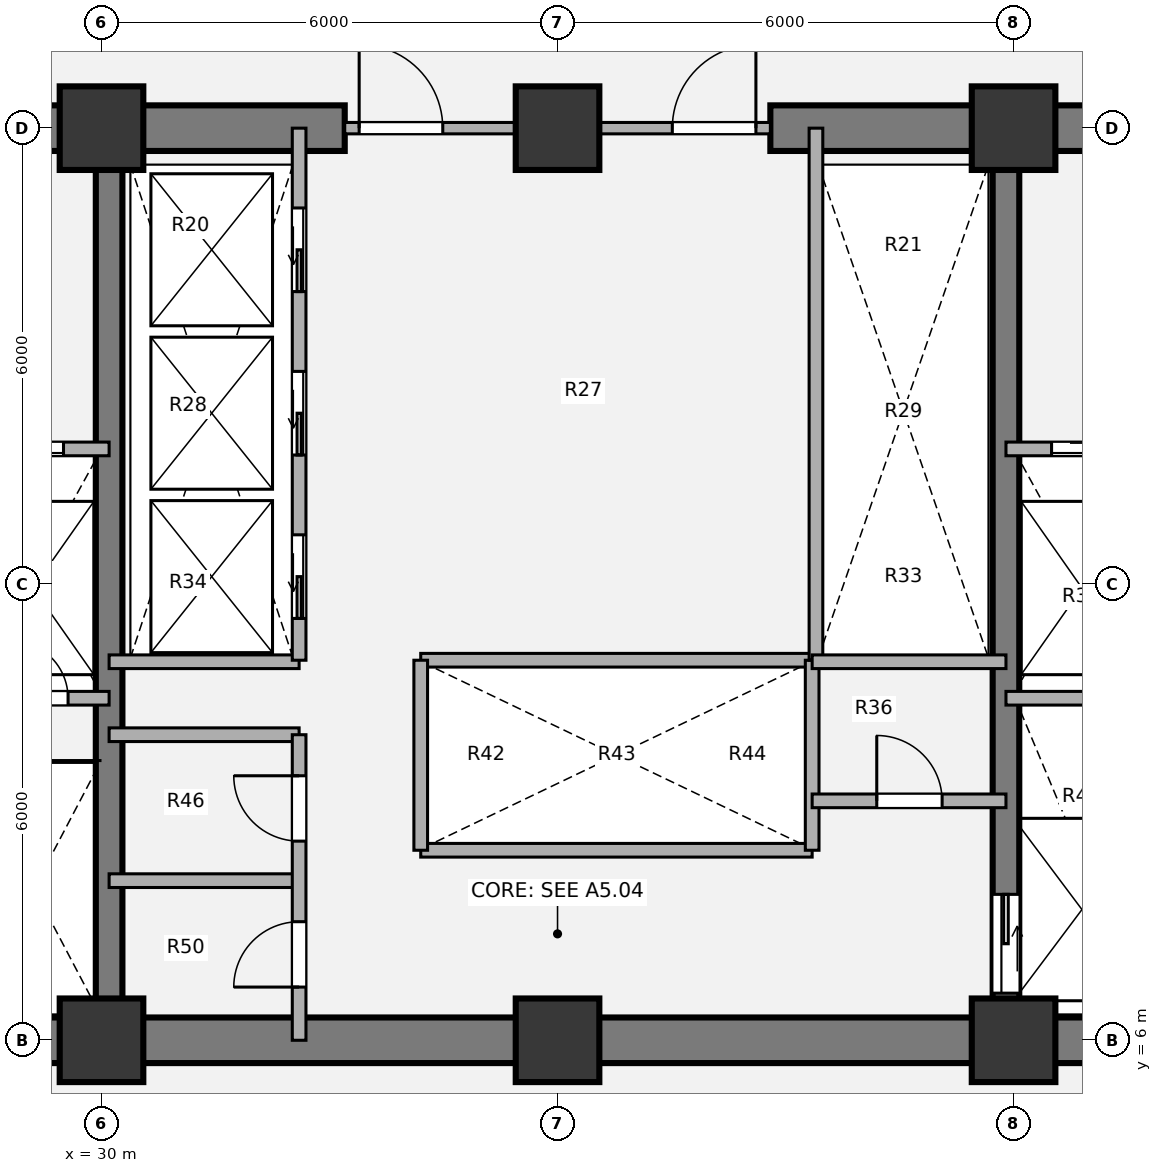
"""IFC4 building model, lengths in metres.
Left out: names, types, materials, properties, quantities, classifications, styles, units other than length and angle.
Written with IfcOpenShell. Run it as: python <this file> out.ifc"""

import sys

from ifc_helpers import new_model, si_unit, direction, frame, frame_2d, origin, origin_2d, place, context, subcontext, project, spatial, rectangle, extrude, source, transform, mapped, element, fill, save


model = new_model("IFC4")
c1 = context("Model", 3, precision=1e-05, world=origin(), true_north=direction((0.0, 1.0)))
c2 = subcontext(c1, "Body", "Model", "MODEL_VIEW")
j1 = project(units=[si_unit("LENGTHUNIT", "METRE"), si_unit("PLANEANGLEUNIT", "RADIAN")], contexts=[c1])
p1 = place(None, origin())
s1 = spatial("IfcSite", under=j1, at=p1, CompositionType="ELEMENT")
p2 = place(p1, origin())
s2 = spatial("IfcBuilding", under=s1, at=p2, CompositionType="ELEMENT")
p3 = place(p2, frame((0.0, 0.0, 42.12)))
s3 = spatial("IfcBuildingStorey", under=s2, at=p3, CompositionType="ELEMENT", Elevation=42.12)
m1 = source(origin(), c2, "Body", "SweptSolid", [
    extrude(rectangle(XDim=1.1, YDim=1.1, at=origin_2d()), origin(), (0.0, 0.0, 1.0), 3.78),
])
for number, where, z_axis, x_axis in (
    (1, (30.0, 6.0, 0.0), (0.0, 0.0, 1.0), (1.0, 0.0, 0.0)),
    (2, (36.0, 6.0, 0.0), (0.0, 0.0, 1.0), (1.0, 0.0, 0.0)),
    (3, (42.0, 6.0, 0.0), (0.0, 0.0, 1.0), (1.0, 0.0, 0.0)),
    (4, (30.0, 18.0, 0.0), (0.0, 0.0, 1.0), (1.0, 0.0, 0.0)),
    (5, (36.0, 18.0, 0.0), (0.0, 0.0, 1.0), (1.0, 0.0, 0.0)),
    (6, (42.0, 18.0, 0.0), (0.0, 0.0, 1.0), (1.0, 0.0, 0.0)),
):
    element("IfcColumn", number, at=place(p3, frame(where, z_axis=z_axis, x_axis=x_axis)), inside=s3, PredefinedType="COLUMN", context=c2, shape_type="MappedRepresentation", body=[
        mapped(m1, transform((0.0, 0.0, 0.0), x_axis=(1.0, 0.0, 0.0), y_axis=(0.0, 1.0, 0.0), z_axis=(0.0, 0.0, 1.0), scale=1.0)),
    ])
p4 = place(p3, frame((48.3, 6.0, 0.0), z_axis=(0.0, 0.0, 1.0), x_axis=(-1.0, 0.0, 0.0)))
e7 = element("IfcWall", 7, at=p4, inside=s3, PredefinedType="SHEAR", context=c2, shape_type="SweptSolid", body=[
    extrude(rectangle(XDim=24.6, YDim=0.6, at=frame_2d((12.3, 0.0))), origin(), (0.0, 0.0, 1.0), 3.78),
])
p5 = place(p3, frame((23.7, 18.0, 0.0), z_axis=(0.0, 0.0, 1.0), x_axis=(1.0, 0.0, 0.0)))
e8 = element("IfcWall", 8, at=p5, inside=s3, PredefinedType="SHEAR", context=c2, shape_type="SweptSolid", body=[
    extrude(rectangle(XDim=9.5, YDim=0.6, at=frame_2d((4.75, 0.0))), origin(), (0.0, 0.0, 1.0), 3.78),
])
p6 = place(p5, frame((2.95, 0.0, 0.0)))
e9 = element("IfcOpeningElement", 9, at=p6, cuts=e8, PredefinedType="OPENING", context=c2, shape_type="SweptSolid", body=[
    extrude(rectangle(XDim=1.1, YDim=2.1, at=origin_2d()), frame((0.55, 0.31, 1.05), z_axis=(0.0, -1.0, 0.0), x_axis=(1.0, 0.0, 0.0)), (0.0, 0.0, 1.0), 0.62),
])
p7 = place(p3, frame((38.8, 18.0, 0.0), z_axis=(0.0, 0.0, 1.0), x_axis=(1.0, 0.0, 0.0)))
e10 = element("IfcWall", 10, at=p7, inside=s3, PredefinedType="SHEAR", context=c2, shape_type="SweptSolid", body=[
    extrude(rectangle(XDim=9.5, YDim=0.6, at=frame_2d((4.75, 0.0))), origin(), (0.0, 0.0, 1.0), 3.78),
])
p8 = place(p7, frame((5.45, 0.0, 0.0)))
e11 = element("IfcOpeningElement", 11, at=p8, cuts=e10, PredefinedType="OPENING", context=c2, shape_type="SweptSolid", body=[
    extrude(rectangle(XDim=1.1, YDim=2.1, at=origin_2d()), frame((0.55, 0.31, 1.05), z_axis=(0.0, -1.0, 0.0), x_axis=(1.0, 0.0, 0.0)), (0.0, 0.0, 1.0), 0.62),
])
p9 = place(p3, frame((30.1, 6.0, 0.0), z_axis=(0.0, 0.0, 1.0), x_axis=(0.0, 1.0, 0.0)))
e12 = element("IfcWall", 12, at=p9, inside=s3, PredefinedType="SHEAR", context=c2, shape_type="SweptSolid", body=[
    extrude(rectangle(XDim=12.0, YDim=0.35, at=frame_2d((6.0, 0.0))), origin(), (0.0, 0.0, 1.0), 3.78),
])
p10 = place(p3, frame((41.9, 18.0, 0.0), z_axis=(0.0, 0.0, 1.0), x_axis=(0.0, -1.0, 0.0)))
e13 = element("IfcWall", 13, at=p10, inside=s3, PredefinedType="SHEAR", context=c2, shape_type="SweptSolid", body=[
    extrude(rectangle(XDim=12.0, YDim=0.35, at=frame_2d((6.0, 0.0))), origin(), (0.0, 0.0, 1.0), 3.78),
])
p11 = place(p10, frame((10.08, 0.0, 0.0)))
e14 = element("IfcOpeningElement", 14, at=p11, cuts=e13, PredefinedType="OPENING", context=c2, shape_type="SweptSolid", body=[
    extrude(rectangle(XDim=1.3, YDim=2.1, at=origin_2d()), frame((0.65, 0.185, 1.05), z_axis=(0.0, -1.0, 0.0), x_axis=(1.0, 0.0, 0.0)), (0.0, 0.0, 1.0), 0.37),
])
for number, where, z_axis, x_axis in (
    (15, (34.2, 11.0, 0.0), (0.0, 0.0, 1.0), (1.0, 0.0, 0.0)),
    (16, (34.2, 8.5, 0.0), (0.0, 0.0, 1.0), (1.0, 0.0, 0.0)),
):
    element("IfcWall", number, at=place(p3, frame(where, z_axis=z_axis, x_axis=x_axis)), inside=s3, PredefinedType="PARTITIONING", context=c2, shape_type="SweptSolid", body=[
        extrude(rectangle(XDim=5.15, YDim=0.18, at=frame_2d((2.575, 0.0))), origin(), (0.0, 0.0, 1.0), 3.5),
    ])
for number, where, z_axis, x_axis in (
    (17, (34.2, 8.5, 0.0), (0.0, 0.0, 1.0), (0.0, 1.0, 0.0)),
    (18, (39.35, 8.5, 0.0), (0.0, 0.0, 1.0), (0.0, 1.0, 0.0)),
):
    element("IfcWall", number, at=place(p3, frame(where, z_axis=z_axis, x_axis=x_axis)), inside=s3, PredefinedType="PARTITIONING", context=c2, shape_type="SweptSolid", body=[
        extrude(rectangle(XDim=2.5, YDim=0.18, at=frame_2d((1.25, 0.0))), origin(), (0.0, 0.0, 1.0), 3.5),
    ])
p12 = place(p3, frame((39.4, 11.0, 0.0), z_axis=(0.0, 0.0, 1.0), x_axis=(0.0, 1.0, 0.0)))
e19 = element("IfcWall", 19, at=p12, inside=s3, PredefinedType="PARTITIONING", context=c2, shape_type="SweptSolid", body=[
    extrude(rectangle(XDim=7.0, YDim=0.18, at=frame_2d((3.5, 0.0))), origin(), (0.0, 0.0, 1.0), 3.5),
])
p13 = place(p3, frame((30.1, 10.98, 0.0), z_axis=(0.0, 0.0, 1.0), x_axis=(1.0, 0.0, 0.0)))
e20 = element("IfcWall", 20, at=p13, inside=s3, PredefinedType="PARTITIONING", context=c2, shape_type="SweptSolid", body=[
    extrude(rectangle(XDim=2.5, YDim=0.18, at=frame_2d((1.25, 0.0))), origin(), (0.0, 0.0, 1.0), 3.5),
])
p14 = place(p3, frame((39.35, 10.98, 0.0), z_axis=(0.0, 0.0, 1.0), x_axis=(1.0, 0.0, 0.0)))
e21 = element("IfcWall", 21, at=p14, inside=s3, PredefinedType="PARTITIONING", context=c2, shape_type="SweptSolid", body=[
    extrude(rectangle(XDim=2.55, YDim=0.18, at=frame_2d((1.275, 0.0))), origin(), (0.0, 0.0, 1.0), 3.5),
])
for number, where, z_axis, x_axis in (
    (22, (30.1, 8.1, 0.0), (0.0, 0.0, 1.0), (1.0, 0.0, 0.0)),
    (23, (30.1, 10.02, 0.0), (0.0, 0.0, 1.0), (1.0, 0.0, 0.0)),
):
    element("IfcWall", number, at=place(p3, frame(where, z_axis=z_axis, x_axis=x_axis)), inside=s3, PredefinedType="PARTITIONING", context=c2, shape_type="SweptSolid", body=[
        extrude(rectangle(XDim=2.5, YDim=0.18, at=frame_2d((1.25, 0.0))), origin(), (0.0, 0.0, 1.0), 3.5),
    ])
p15 = place(p3, frame((32.6, 6.0, 0.0), z_axis=(0.0, 0.0, 1.0), x_axis=(0.0, 1.0, 0.0)))
e24 = element("IfcWall", 24, at=p15, inside=s3, PredefinedType="PARTITIONING", context=c2, shape_type="SweptSolid", body=[
    extrude(rectangle(XDim=4.02, YDim=0.18, at=frame_2d((2.01, 0.0))), origin(), (0.0, 0.0, 1.0), 3.5),
])
p16 = place(p15, frame((0.7, 0.0, 0.0)))
e25 = element("IfcOpeningElement", 25, at=p16, cuts=e24, PredefinedType="OPENING", context=c2, shape_type="SweptSolid", body=[
    extrude(rectangle(XDim=0.86, YDim=2.1, at=origin_2d()), frame((0.43, 0.1, 1.05), z_axis=(0.0, -1.0, 0.0), x_axis=(1.0, 0.0, 0.0)), (0.0, 0.0, 1.0), 0.2),
])
p17 = place(p15, frame((2.62, 0.0, 0.0)))
e26 = element("IfcOpeningElement", 26, at=p17, cuts=e24, PredefinedType="OPENING", context=c2, shape_type="SweptSolid", body=[
    extrude(rectangle(XDim=0.86, YDim=2.1, at=origin_2d()), frame((0.43, 0.1, 1.05), z_axis=(0.0, -1.0, 0.0), x_axis=(1.0, 0.0, 0.0)), (0.0, 0.0, 1.0), 0.2),
])
p18 = place(p3, frame((39.35, 9.15, 0.0), z_axis=(0.0, 0.0, 1.0), x_axis=(1.0, 0.0, 0.0)))
e27 = element("IfcWall", 27, at=p18, inside=s3, PredefinedType="PARTITIONING", context=c2, shape_type="SweptSolid", body=[
    extrude(rectangle(XDim=2.55, YDim=0.18, at=frame_2d((1.275, 0.0))), origin(), (0.0, 0.0, 1.0), 3.5),
])
p19 = place(p18, frame((0.85, 0.0, 0.0)))
e28 = element("IfcOpeningElement", 28, at=p19, cuts=e27, PredefinedType="OPENING", context=c2, shape_type="SweptSolid", body=[
    extrude(rectangle(XDim=0.86, YDim=2.1, at=origin_2d()), frame((0.43, 0.1, 1.05), z_axis=(0.0, -1.0, 0.0), x_axis=(1.0, 0.0, 0.0)), (0.0, 0.0, 1.0), 0.2),
])
p20 = place(p3, frame((33.2, 18.0, 0.0), z_axis=(0.0, 0.0, 1.0), x_axis=(1.0, 0.0, 0.0)))
e29 = element("IfcWall", 29, at=p20, inside=s3, PredefinedType="PARTITIONING", context=c2, shape_type="SweptSolid", body=[
    extrude(rectangle(XDim=5.6, YDim=0.15, at=frame_2d((2.8, 0.0))), origin(), (0.0, 0.0, 1.0), 2.315),
])
p21 = place(p20, frame((0.19, 0.0, 0.0)))
e30 = element("IfcOpeningElement", 30, at=p21, cuts=e29, PredefinedType="OPENING", context=c2, shape_type="SweptSolid", body=[
    extrude(rectangle(XDim=1.1, YDim=2.1, at=origin_2d()), frame((0.55, 0.085, 1.05), z_axis=(0.0, -1.0, 0.0), x_axis=(1.0, 0.0, 0.0)), (0.0, 0.0, 1.0), 0.17),
])
p22 = place(p20, frame((4.31, 0.0, 0.0)))
e31 = element("IfcOpeningElement", 31, at=p22, cuts=e29, PredefinedType="OPENING", context=c2, shape_type="SweptSolid", body=[
    extrude(rectangle(XDim=1.1, YDim=2.1, at=origin_2d()), frame((0.55, 0.085, 1.05), z_axis=(0.0, -1.0, 0.0), x_axis=(1.0, 0.0, 0.0)), (0.0, 0.0, 1.0), 0.17),
])
p23 = place(p3, frame((24.0, 13.78, 0.0), z_axis=(0.0, 0.0, 1.0), x_axis=(1.0, 0.0, 0.0)))
e32 = element("IfcWall", 32, at=p23, inside=s3, PredefinedType="PARTITIONING", context=c2, shape_type="SweptSolid", body=[
    extrude(rectangle(XDim=6.1, YDim=0.18, at=frame_2d((3.05, 0.0))), origin(), (0.0, 0.0, 1.0), 3.5),
])
p24 = place(p23, frame((1.15, 0.0, 0.0)))
e33 = element("IfcOpeningElement", 33, at=p24, cuts=e32, PredefinedType="OPENING", context=c2, shape_type="SweptSolid", body=[
    extrude(rectangle(XDim=1.1, YDim=2.1, at=origin_2d()), frame((0.55, 0.1, 1.05), z_axis=(0.0, -1.0, 0.0), x_axis=(1.0, 0.0, 0.0)), (0.0, 0.0, 1.0), 0.2),
])
p25 = place(p23, frame((4.4, 0.0, 0.0)))
e34 = element("IfcOpeningElement", 34, at=p25, cuts=e32, PredefinedType="OPENING", context=c2, shape_type="SweptSolid", body=[
    extrude(rectangle(XDim=1.1, YDim=2.1, at=origin_2d()), frame((0.55, 0.1, 1.05), z_axis=(0.0, -1.0, 0.0), x_axis=(1.0, 0.0, 0.0)), (0.0, 0.0, 1.0), 0.2),
])
p26 = place(p3, frame((28.15, 10.5, 0.0), z_axis=(0.0, 0.0, 1.0), x_axis=(1.0, 0.0, 0.0)))
e35 = element("IfcWall", 35, at=p26, inside=s3, PredefinedType="PARTITIONING", context=c2, shape_type="SweptSolid", body=[
    extrude(rectangle(XDim=1.95, YDim=0.18, at=frame_2d((0.975, 0.0))), origin(), (0.0, 0.0, 1.0), 3.5),
])
p27 = place(p26, frame((0.65, 0.0, 0.0)))
e36 = element("IfcOpeningElement", 36, at=p27, cuts=e35, PredefinedType="OPENING", context=c2, shape_type="SweptSolid", body=[
    extrude(rectangle(XDim=0.76, YDim=2.05, at=origin_2d()), frame((0.38, 0.1, 1.025), z_axis=(0.0, -1.0, 0.0), x_axis=(1.0, 0.0, 0.0)), (0.0, 0.0, 1.0), 0.2),
])
p28 = place(p3, frame((41.9, 13.78, 0.0), z_axis=(0.0, 0.0, 1.0), x_axis=(1.0, 0.0, 0.0)))
e37 = element("IfcWall", 37, at=p28, inside=s3, PredefinedType="PARTITIONING", context=c2, shape_type="SweptSolid", body=[
    extrude(rectangle(XDim=6.1, YDim=0.18, at=frame_2d((3.05, 0.0))), origin(), (0.0, 0.0, 1.0), 3.5),
])
p29 = place(p28, frame((0.6, 0.0, 0.0)))
e38 = element("IfcOpeningElement", 38, at=p29, cuts=e37, PredefinedType="OPENING", context=c2, shape_type="SweptSolid", body=[
    extrude(rectangle(XDim=1.1, YDim=2.1, at=origin_2d()), frame((0.55, 0.1, 1.05), z_axis=(0.0, -1.0, 0.0), x_axis=(1.0, 0.0, 0.0)), (0.0, 0.0, 1.0), 0.2),
])
p30 = place(p28, frame((3.8, 0.0, 0.0)))
e39 = element("IfcOpeningElement", 39, at=p30, cuts=e37, PredefinedType="OPENING", context=c2, shape_type="SweptSolid", body=[
    extrude(rectangle(XDim=1.1, YDim=2.1, at=origin_2d()), frame((0.55, 0.1, 1.05), z_axis=(0.0, -1.0, 0.0), x_axis=(1.0, 0.0, 0.0)), (0.0, 0.0, 1.0), 0.2),
])
p31 = place(p3, frame((41.9, 10.5, 0.0), z_axis=(0.0, 0.0, 1.0), x_axis=(1.0, 0.0, 0.0)))
e40 = element("IfcWall", 40, at=p31, inside=s3, PredefinedType="PARTITIONING", context=c2, shape_type="SweptSolid", body=[
    extrude(rectangle(XDim=1.95, YDim=0.18, at=frame_2d((0.975, 0.0))), origin(), (0.0, 0.0, 1.0), 3.5),
])
p32 = place(p3, frame((32.6, 11.0, 0.0), z_axis=(0.0, 0.0, 1.0), x_axis=(0.0, 1.0, 0.0)))
e41 = element("IfcWall", 41, at=p32, inside=s3, PredefinedType="PARTITIONING", context=c2, shape_type="SweptSolid", body=[
    extrude(rectangle(XDim=7.0, YDim=0.18, at=frame_2d((3.5, 0.0))), origin(), (0.0, 0.0, 1.0), 3.5),
])
p33 = place(p32, frame((0.55, 0.0, 0.0)))
e42 = element("IfcOpeningElement", 42, at=p33, cuts=e41, PredefinedType="OPENING", context=c2, shape_type="SweptSolid", body=[
    extrude(rectangle(XDim=1.1, YDim=2.1, at=origin_2d()), frame((0.55, 0.1, 1.05), z_axis=(0.0, -1.0, 0.0), x_axis=(1.0, 0.0, 0.0)), (0.0, 0.0, 1.0), 0.2),
])
p34 = place(p32, frame((2.7, 0.0, 0.0)))
e43 = element("IfcOpeningElement", 43, at=p34, cuts=e41, PredefinedType="OPENING", context=c2, shape_type="SweptSolid", body=[
    extrude(rectangle(XDim=1.1, YDim=2.1, at=origin_2d()), frame((0.55, 0.1, 1.05), z_axis=(0.0, -1.0, 0.0), x_axis=(1.0, 0.0, 0.0)), (0.0, 0.0, 1.0), 0.2),
])
p35 = place(p32, frame((4.85, 0.0, 0.0)))
e44 = element("IfcOpeningElement", 44, at=p35, cuts=e41, PredefinedType="OPENING", context=c2, shape_type="SweptSolid", body=[
    extrude(rectangle(XDim=1.1, YDim=2.1, at=origin_2d()), frame((0.55, 0.1, 1.05), z_axis=(0.0, -1.0, 0.0), x_axis=(1.0, 0.0, 0.0)), (0.0, 0.0, 1.0), 0.2),
])
m2 = source(origin(), c2, "Body", "SweptSolid", [
    extrude(rectangle(XDim=0.86, YDim=2.1, at=origin_2d()), frame((0.43, 0.025, 1.05), z_axis=(0.0, -1.0, 0.0), x_axis=(1.0, 0.0, 0.0)), (0.0, 0.0, 1.0), 0.05),
])
p36 = place(p16, origin())
e45 = element("IfcDoor", 45, at=p36, inside=s3, OperationType="SINGLE_SWING_LEFT", PredefinedType="DOOR", context=c2, shape_type="MappedRepresentation", body=[
    mapped(m2, transform((0.0, 0.0, 0.0), x_axis=(1.0, 0.0, 0.0), y_axis=(0.0, 1.0, 0.0), z_axis=(0.0, 0.0, 1.0), scale=1.0)),
])
fill(e25, e45)
p37 = place(p17, origin())
e46 = element("IfcDoor", 46, at=p37, inside=s3, OperationType="SINGLE_SWING_RIGHT", PredefinedType="DOOR", context=c2, shape_type="MappedRepresentation", body=[
    mapped(m2, transform((0.0, 0.0, 0.0), x_axis=(1.0, 0.0, 0.0), y_axis=(0.0, 1.0, 0.0), z_axis=(0.0, 0.0, 1.0), scale=1.0)),
])
fill(e26, e46)
p38 = place(p19, origin())
e47 = element("IfcDoor", 47, at=p38, inside=s3, OperationType="SINGLE_SWING_LEFT", PredefinedType="DOOR", context=c2, shape_type="MappedRepresentation", body=[
    mapped(m2, transform((0.0, 0.0, 0.0), x_axis=(1.0, 0.0, 0.0), y_axis=(0.0, 1.0, 0.0), z_axis=(0.0, 0.0, 1.0), scale=1.0)),
])
fill(e28, e47)
m3 = source(origin(), c2, "Body", "SweptSolid", [
    extrude(rectangle(XDim=1.1, YDim=2.1, at=origin_2d()), frame((0.55, 0.025, 1.05), z_axis=(0.0, -1.0, 0.0), x_axis=(1.0, 0.0, 0.0)), (0.0, 0.0, 1.0), 0.05),
])
p39 = place(p21, origin())
e48 = element("IfcDoor", 48, at=p39, inside=s3, OperationType="SINGLE_SWING_LEFT", PredefinedType="DOOR", context=c2, shape_type="MappedRepresentation", body=[
    mapped(m3, transform((0.0, 0.0, 0.0), x_axis=(1.0, 0.0, 0.0), y_axis=(0.0, 1.0, 0.0), z_axis=(0.0, 0.0, 1.0), scale=1.0)),
])
fill(e30, e48)
p40 = place(p22, origin())
e49 = element("IfcDoor", 49, at=p40, inside=s3, OperationType="SINGLE_SWING_RIGHT", PredefinedType="DOOR", context=c2, shape_type="MappedRepresentation", body=[
    mapped(m3, transform((0.0, 0.0, 0.0), x_axis=(1.0, 0.0, 0.0), y_axis=(0.0, 1.0, 0.0), z_axis=(0.0, 0.0, 1.0), scale=1.0)),
])
fill(e31, e49)
m4 = source(origin(), c2, "Body", "SweptSolid", [
    extrude(rectangle(XDim=1.1, YDim=2.1, at=origin_2d()), frame((0.55, 0.025, 1.05), z_axis=(0.0, -1.0, 0.0), x_axis=(1.0, 0.0, 0.0)), (0.0, 0.0, 1.0), 0.05),
])
p41 = place(p25, origin())
e50 = element("IfcDoor", 50, at=p41, inside=s3, OperationType="SLIDING_TO_LEFT", PredefinedType="DOOR", context=c2, shape_type="MappedRepresentation", body=[
    mapped(m4, transform((0.0, 0.0, 0.0), x_axis=(1.0, 0.0, 0.0), y_axis=(0.0, 1.0, 0.0), z_axis=(0.0, 0.0, 1.0), scale=1.0)),
])
fill(e34, e50)
m5 = source(origin(), c2, "Body", "SweptSolid", [
    extrude(rectangle(XDim=0.76, YDim=2.05, at=origin_2d()), frame((0.38, 0.025, 1.025), z_axis=(0.0, -1.0, 0.0), x_axis=(1.0, 0.0, 0.0)), (0.0, 0.0, 1.0), 0.05),
])
p42 = place(p27, origin())
e51 = element("IfcDoor", 51, at=p42, inside=s3, OperationType="SINGLE_SWING_LEFT", PredefinedType="DOOR", context=c2, shape_type="MappedRepresentation", body=[
    mapped(m5, transform((0.0, 0.0, 0.0), x_axis=(1.0, 0.0, 0.0), y_axis=(0.0, 1.0, 0.0), z_axis=(0.0, 0.0, 1.0), scale=1.0)),
])
fill(e36, e51)
p43 = place(p29, origin())
e52 = element("IfcDoor", 52, at=p43, inside=s3, OperationType="SLIDING_TO_RIGHT", PredefinedType="DOOR", context=c2, shape_type="MappedRepresentation", body=[
    mapped(m4, transform((0.0, 0.0, 0.0), x_axis=(1.0, 0.0, 0.0), y_axis=(0.0, 1.0, 0.0), z_axis=(0.0, 0.0, 1.0), scale=1.0)),
])
fill(e38, e52)
m6 = source(origin(), c2, "Body", "SweptSolid", [
    extrude(rectangle(XDim=1.3, YDim=2.1, at=origin_2d()), frame((0.65, 0.025, 1.05), z_axis=(0.0, -1.0, 0.0), x_axis=(1.0, 0.0, 0.0)), (0.0, 0.0, 1.0), 0.05),
])
p44 = place(p11, origin())
e53 = element("IfcDoor", 53, at=p44, inside=s3, OperationType="SLIDING_TO_LEFT", PredefinedType="DOOR", context=c2, shape_type="MappedRepresentation", body=[
    mapped(m6, transform((0.0, 0.0, 0.0), x_axis=(1.0, 0.0, 0.0), y_axis=(0.0, 1.0, 0.0), z_axis=(0.0, 0.0, 1.0), scale=1.0)),
])
fill(e14, e53)
p45 = place(p33, origin())
e54 = element("IfcDoor", 54, at=p45, inside=s3, OperationType="SLIDING_TO_LEFT", PredefinedType="DOOR", context=c2, shape_type="MappedRepresentation", body=[
    mapped(m4, transform((0.0, 0.0, 0.0), x_axis=(1.0, 0.0, 0.0), y_axis=(0.0, 1.0, 0.0), z_axis=(0.0, 0.0, 1.0), scale=1.0)),
])
fill(e42, e54)
p46 = place(p34, origin())
e55 = element("IfcDoor", 55, at=p46, inside=s3, OperationType="SLIDING_TO_LEFT", PredefinedType="DOOR", context=c2, shape_type="MappedRepresentation", body=[
    mapped(m4, transform((0.0, 0.0, 0.0), x_axis=(1.0, 0.0, 0.0), y_axis=(0.0, 1.0, 0.0), z_axis=(0.0, 0.0, 1.0), scale=1.0)),
])
fill(e43, e55)
p47 = place(p35, origin())
e56 = element("IfcDoor", 56, at=p47, inside=s3, OperationType="SLIDING_TO_LEFT", PredefinedType="DOOR", context=c2, shape_type="MappedRepresentation", body=[
    mapped(m4, transform((0.0, 0.0, 0.0), x_axis=(1.0, 0.0, 0.0), y_axis=(0.0, 1.0, 0.0), z_axis=(0.0, 0.0, 1.0), scale=1.0)),
])
fill(e44, e56)
save(model, sys.argv[1])
